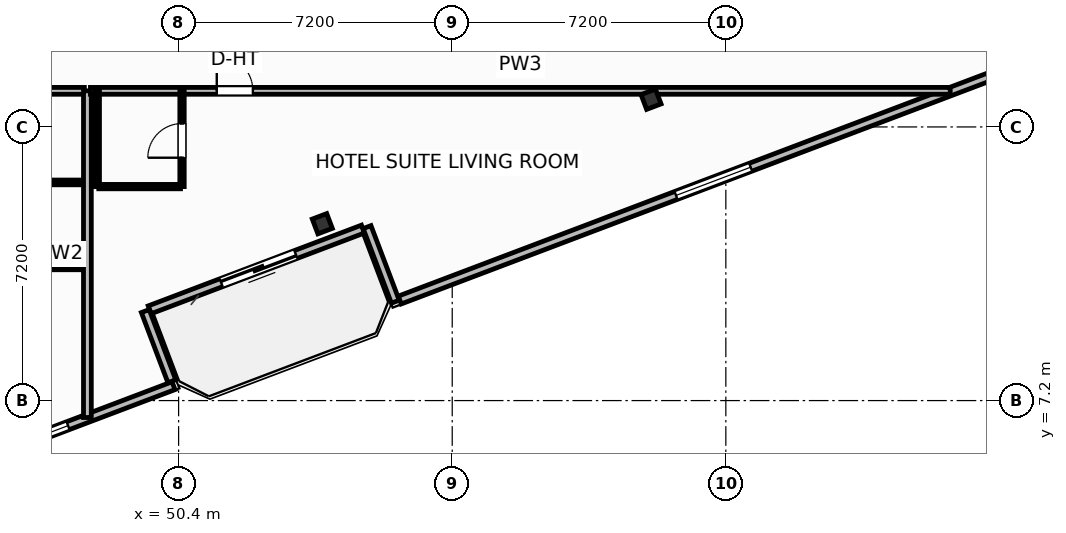
"""IFC4 building model, lengths in metres.
Left out: names, types, materials, properties, quantities, classifications, styles, units other than length and angle.
Written with IfcOpenShell. Run it as: python <this file> out.ifc"""

import sys

from ifc_helpers import new_model, si_unit, direction, frame, frame_2d, origin, origin_2d, place, context, subcontext, project, spatial, rectangle, i_section, extrude, element, fill, save


model = new_model("IFC4")
c1 = context("Model", 3, precision=1e-05, world=origin(), true_north=direction((0.0, 1.0)))
c2 = subcontext(c1, "Body", "Model", "MODEL_VIEW")
j1 = project(units=[si_unit("LENGTHUNIT", "METRE"), si_unit("PLANEANGLEUNIT", "RADIAN")], contexts=[c1])
p1 = place(None, origin())
s1 = spatial("IfcSite", under=j1, at=p1, CompositionType="ELEMENT")
p2 = place(p1, origin())
s2 = spatial("IfcBuilding", under=s1, at=p2, CompositionType="ELEMENT")
p3 = place(p2, frame((0.0, 0.0, 227.5)))
s3 = spatial("IfcBuildingStorey", under=s2, at=p3, CompositionType="ELEMENT", Elevation=227.5)
for number, where, z_axis, x_axis in (
    (1, (54.181, 11.853, 0.0), (0.0, 0.0, 1.0), (0.935, 0.354, 0.0)),
    (2, (62.832, 15.128, 0.0), (0.0, 0.0, 1.0), (0.935, 0.354, 0.0)),
):
    element("IfcColumn", number, at=place(p3, frame(where, z_axis=z_axis, x_axis=x_axis)), inside=s3, PredefinedType="COLUMN", context=c2, shape_type="SweptSolid", body=[
        extrude(i_section(OverallWidth=0.406, OverallDepth=0.416, WebThickness=0.03, FlangeThickness=0.048, FilletRadius=0.025, at=origin_2d()), origin(), (0.0, 0.0, 1.0), 3.7),
    ])
p4 = place(p3, frame((55.25, 11.713, 0.0), z_axis=(0.0, 0.0, 1.0), x_axis=(-0.935227640088, -0.354046976001, 0.0)))
e3 = element("IfcWall", 3, at=p4, inside=s3, PredefinedType="SOLIDWALL", context=c2, shape_type="SweptSolid", body=[
    extrude(rectangle(XDim=6.0, YDim=0.22, at=frame_2d((3.0, 0.0))), origin(), (0.0, 0.0, 1.0), 2.73),
])
p5 = place(p4, frame((1.888, 0.0, 0.0)))
e4 = element("IfcOpeningElement", 4, at=p5, cuts=e3, PredefinedType="OPENING", context=c2, shape_type="SweptSolid", body=[
    extrude(rectangle(XDim=2.1, YDim=2.3, at=frame_2d((1.05, 1.15))), frame((0.0, 0.12, 0.0), z_axis=(0.0, -1.0, 0.0), x_axis=(1.0, 0.0, 0.0)), (0.0, 0.0, 1.0), 0.24),
])
p6 = place(p3, frame((42.752, 4.746, 0.0), z_axis=(0.0, 0.0, 1.0), x_axis=(0.935216926991, 0.354075273733, 0.0)))
e5 = element("IfcWall", 5, at=p6, inside=s3, PredefinedType="SOLIDWALL", context=c2, shape_type="SweptSolid", body=[
    extrude(rectangle(XDim=8.035, YDim=0.22, at=frame_2d((4.018, 0.0))), origin(), (0.0, 0.0, 1.0), 2.73),
])
p7 = place(p6, frame((2.968, 0.0, 0.8)))
e6 = element("IfcOpeningElement", 6, at=p7, cuts=e5, PredefinedType="OPENING", context=c2, shape_type="SweptSolid", body=[
    extrude(rectangle(XDim=2.1, YDim=1.75, at=frame_2d((1.05, 0.875))), frame((0.0, 0.12, 0.0), z_axis=(0.0, -1.0, 0.0), x_axis=(1.0, 0.0, 0.0)), (0.0, 0.0, 1.0), 0.24),
])
p8 = place(p3, frame((50.223, 7.708, 0.0), z_axis=(0.0, 0.0, 1.0), x_axis=(-0.354020680661, 0.935237594232, 0.0)))
e7 = element("IfcWall", 7, at=p8, inside=s3, PredefinedType="SOLIDWALL", context=c2, shape_type="SweptSolid", body=[
    extrude(rectangle(XDim=1.975, YDim=0.22, at=frame_2d((0.988, 0.0))), origin(), (0.0, 0.0, 1.0), 2.73),
])
p9 = place(p3, frame((55.359, 11.764, 0.0), z_axis=(0.0, 0.0, 1.0), x_axis=(0.354026782794, -0.935235284334, 0.0)))
e8 = element("IfcWall", 8, at=p9, inside=s3, PredefinedType="SOLIDWALL", context=c2, shape_type="SweptSolid", body=[
    extrude(rectangle(XDim=2.1, YDim=0.22, at=frame_2d((1.05, 0.0))), origin(), (0.0, 0.0, 1.0), 2.73),
])
p10 = place(p3, frame((56.219, 9.845, 0.0), z_axis=(0.0, 0.0, 1.0), x_axis=(0.935225601791, 0.354052360188, 0.0)))
e9 = element("IfcWall", 9, at=p10, inside=s3, PredefinedType="SOLIDWALL", context=c2, shape_type="SweptSolid", body=[
    extrude(rectangle(XDim=17.647, YDim=0.22, at=frame_2d((8.824, 0.0))), origin(), (0.0, 0.0, 1.0), 2.73),
])
p11 = place(p10, frame((7.774, 0.0, 0.8)))
e10 = element("IfcOpeningElement", 10, at=p11, cuts=e9, PredefinedType="OPENING", context=c2, shape_type="SweptSolid", body=[
    extrude(rectangle(XDim=2.1, YDim=1.75, at=frame_2d((1.05, 0.875))), frame((0.0, 0.12, 0.0), z_axis=(0.0, -1.0, 0.0), x_axis=(1.0, 0.0, 0.0)), (0.0, 0.0, 1.0), 0.24),
])
p12 = place(p3, frame((35.58, 15.35, 0.0), z_axis=(0.0, 0.0, 1.0), x_axis=(1.0, 0.0, 0.0)))
e11 = element("IfcWall", 11, at=p12, inside=s3, PredefinedType="PARTITIONING", context=c2, shape_type="SweptSolid", body=[
    extrude(rectangle(XDim=12.34, YDim=0.18, at=frame_2d((6.17, 0.0))), origin(), (0.0, 0.0, 1.0), 3.45),
])
p13 = place(p12, frame((3.235, 0.0, 0.0)))
e12 = element("IfcOpeningElement", 12, at=p13, cuts=e11, PredefinedType="OPENING", context=c2, shape_type="SweptSolid", body=[
    extrude(rectangle(XDim=1.0, YDim=2.2, at=frame_2d((0.5, 1.1))), frame((0.0, 0.1, 0.0), z_axis=(0.0, -1.0, 0.0), x_axis=(1.0, 0.0, 0.0)), (0.0, 0.0, 1.0), 0.2),
])
p14 = place(p3, frame((43.19, 12.94, 0.0), z_axis=(0.0, 0.0, 1.0), x_axis=(1.0, 0.0, 0.0)))
e13 = element("IfcWall", 13, at=p14, inside=s3, PredefinedType="PARTITIONING", context=c2, shape_type="SweptSolid", body=[
    extrude(rectangle(XDim=4.73, YDim=0.125, at=frame_2d((2.365, 0.0))), origin(), (0.0, 0.0, 1.0), 3.018),
])
p15 = place(p3, frame((43.19, 10.7, 0.0), z_axis=(0.0, 0.0, 1.0), x_axis=(1.0, 0.0, 0.0)))
e14 = element("IfcWall", 14, at=p15, inside=s3, PredefinedType="PARTITIONING", context=c2, shape_type="SweptSolid", body=[
    extrude(rectangle(XDim=4.73, YDim=0.115, at=frame_2d((2.365, 0.0))), origin(), (0.0, 0.0, 1.0), 3.45),
])
p16 = place(p3, frame((48.0, 6.754, 0.0), z_axis=(0.0, 0.0, 1.0), x_axis=(0.0, 1.0, 0.0)))
e15 = element("IfcWall", 15, at=p16, inside=s3, PredefinedType="PARTITIONING", context=c2, shape_type="SweptSolid", body=[
    extrude(rectangle(XDim=8.596, YDim=0.205, at=frame_2d((4.298, 0.0))), origin(), (0.0, 0.0, 1.0), 3.45),
])
p17 = place(p3, frame((48.08, 15.35, 0.0), z_axis=(0.0, 0.0, 1.0), x_axis=(1.0, 0.0, 0.0)))
e16 = element("IfcWall", 16, at=p17, inside=s3, PredefinedType="PARTITIONING", context=c2, shape_type="SweptSolid", body=[
    extrude(rectangle(XDim=22.624, YDim=0.18, at=frame_2d((11.312, 0.0))), origin(), (0.0, 0.0, 1.0), 3.45),
])
p18 = place(p17, frame((3.324, 0.0, 0.0)))
e17 = element("IfcOpeningElement", 17, at=p18, cuts=e16, PredefinedType="OPENING", context=c2, shape_type="SweptSolid", body=[
    extrude(rectangle(XDim=0.95, YDim=2.15, at=frame_2d((0.475, 1.075))), frame((0.0, 0.1, 0.0), z_axis=(0.0, -1.0, 0.0), x_axis=(1.0, 0.0, 0.0)), (0.0, 0.0, 1.0), 0.2),
])
p19 = place(p3, frame((48.3, 12.83, 0.0), z_axis=(0.0, 0.0, 1.0), x_axis=(1.0, 0.0, 0.0)))
e18 = element("IfcWall", 18, at=p19, inside=s3, PredefinedType="PARTITIONING", context=c2, shape_type="SweptSolid", body=[
    extrude(rectangle(XDim=2.15, YDim=0.115, at=frame_2d((1.075, 0.0))), origin(), (0.0, 0.0, 1.0), 3.45),
])
p20 = place(p3, frame((50.49, 12.83, 0.0), z_axis=(0.0, 0.0, 1.0), x_axis=(0.0, 1.0, 0.0)))
e19 = element("IfcWall", 19, at=p20, inside=s3, PredefinedType="PARTITIONING", context=c2, shape_type="SweptSolid", body=[
    extrude(rectangle(XDim=2.52, YDim=0.115, at=frame_2d((1.26, 0.0))), origin(), (0.0, 0.0, 1.0), 3.45),
])
p21 = place(p20, frame((0.76, 0.0, 0.0)))
e20 = element("IfcOpeningElement", 20, at=p21, cuts=e19, PredefinedType="OPENING", context=c2, shape_type="SweptSolid", body=[
    extrude(rectangle(XDim=0.9, YDim=2.05, at=frame_2d((0.45, 1.025))), frame((0.0, 0.067, 0.0), z_axis=(0.0, -1.0, 0.0), x_axis=(1.0, 0.0, 0.0)), (0.0, 0.0, 1.0), 0.135),
])
p22 = place(p3, frame((48.26, 12.83, 0.0), z_axis=(0.0, 0.0, 1.0), x_axis=(0.0, 1.0, 0.0)))
e21 = element("IfcWall", 21, at=p22, inside=s3, PredefinedType="PARTITIONING", context=c2, shape_type="SweptSolid", body=[
    extrude(rectangle(XDim=2.52, YDim=0.115, at=frame_2d((1.26, 0.0))), origin(), (0.0, 0.0, 1.0), 3.45),
])
p23 = place(p5, origin())
e22 = element("IfcDoor", 22, at=p23, inside=s3, OperationType="SLIDING_TO_LEFT", PredefinedType="DOOR", context=c2, shape_type="SweptSolid", body=[
    extrude(rectangle(XDim=2.1, YDim=2.3, at=frame_2d((1.05, 1.15))), frame((0.0, 0.025, 0.0), z_axis=(0.0, -1.0, 0.0), x_axis=(1.0, 0.0, 0.0)), (0.0, 0.0, 1.0), 0.05),
])
fill(e4, e22)
p24 = place(p7, origin())
e23 = element("IfcWindow", 23, at=p24, inside=s3, PartitioningType="SINGLE_PANEL", PredefinedType="WINDOW", context=c2, shape_type="SweptSolid", body=[
    extrude(rectangle(XDim=2.1, YDim=1.75, at=frame_2d((1.05, 0.875))), frame((0.0, 0.03, 0.0), z_axis=(0.0, -1.0, 0.0), x_axis=(1.0, 0.0, 0.0)), (0.0, 0.0, 1.0), 0.06),
])
fill(e6, e23)
p25 = place(p11, origin())
e24 = element("IfcWindow", 24, at=p25, inside=s3, PartitioningType="SINGLE_PANEL", PredefinedType="WINDOW", context=c2, shape_type="SweptSolid", body=[
    extrude(rectangle(XDim=2.1, YDim=1.75, at=frame_2d((1.05, 0.875))), frame((0.0, 0.03, 0.0), z_axis=(0.0, -1.0, 0.0), x_axis=(1.0, 0.0, 0.0)), (0.0, 0.0, 1.0), 0.06),
])
fill(e10, e24)
p26 = place(p18, origin())
e25 = element("IfcDoor", 25, at=p26, inside=s3, OperationType="SINGLE_SWING_LEFT", PredefinedType="DOOR", context=c2, shape_type="SweptSolid", body=[
    extrude(rectangle(XDim=0.95, YDim=2.15, at=frame_2d((0.475, 1.075))), frame((0.0, 0.025, 0.0), z_axis=(0.0, -1.0, 0.0), x_axis=(1.0, 0.0, 0.0)), (0.0, 0.0, 1.0), 0.05),
])
fill(e17, e25)
p27 = place(p21, origin())
e26 = element("IfcDoor", 26, at=p27, inside=s3, OperationType="SINGLE_SWING_LEFT", PredefinedType="DOOR", context=c2, shape_type="SweptSolid", body=[
    extrude(rectangle(XDim=0.9, YDim=2.05, at=frame_2d((0.45, 1.025))), frame((0.0, 0.025, 0.0), z_axis=(0.0, -1.0, 0.0), x_axis=(1.0, 0.0, 0.0)), (0.0, 0.0, 1.0), 0.05),
])
fill(e20, e26)
save(model, sys.argv[1])
